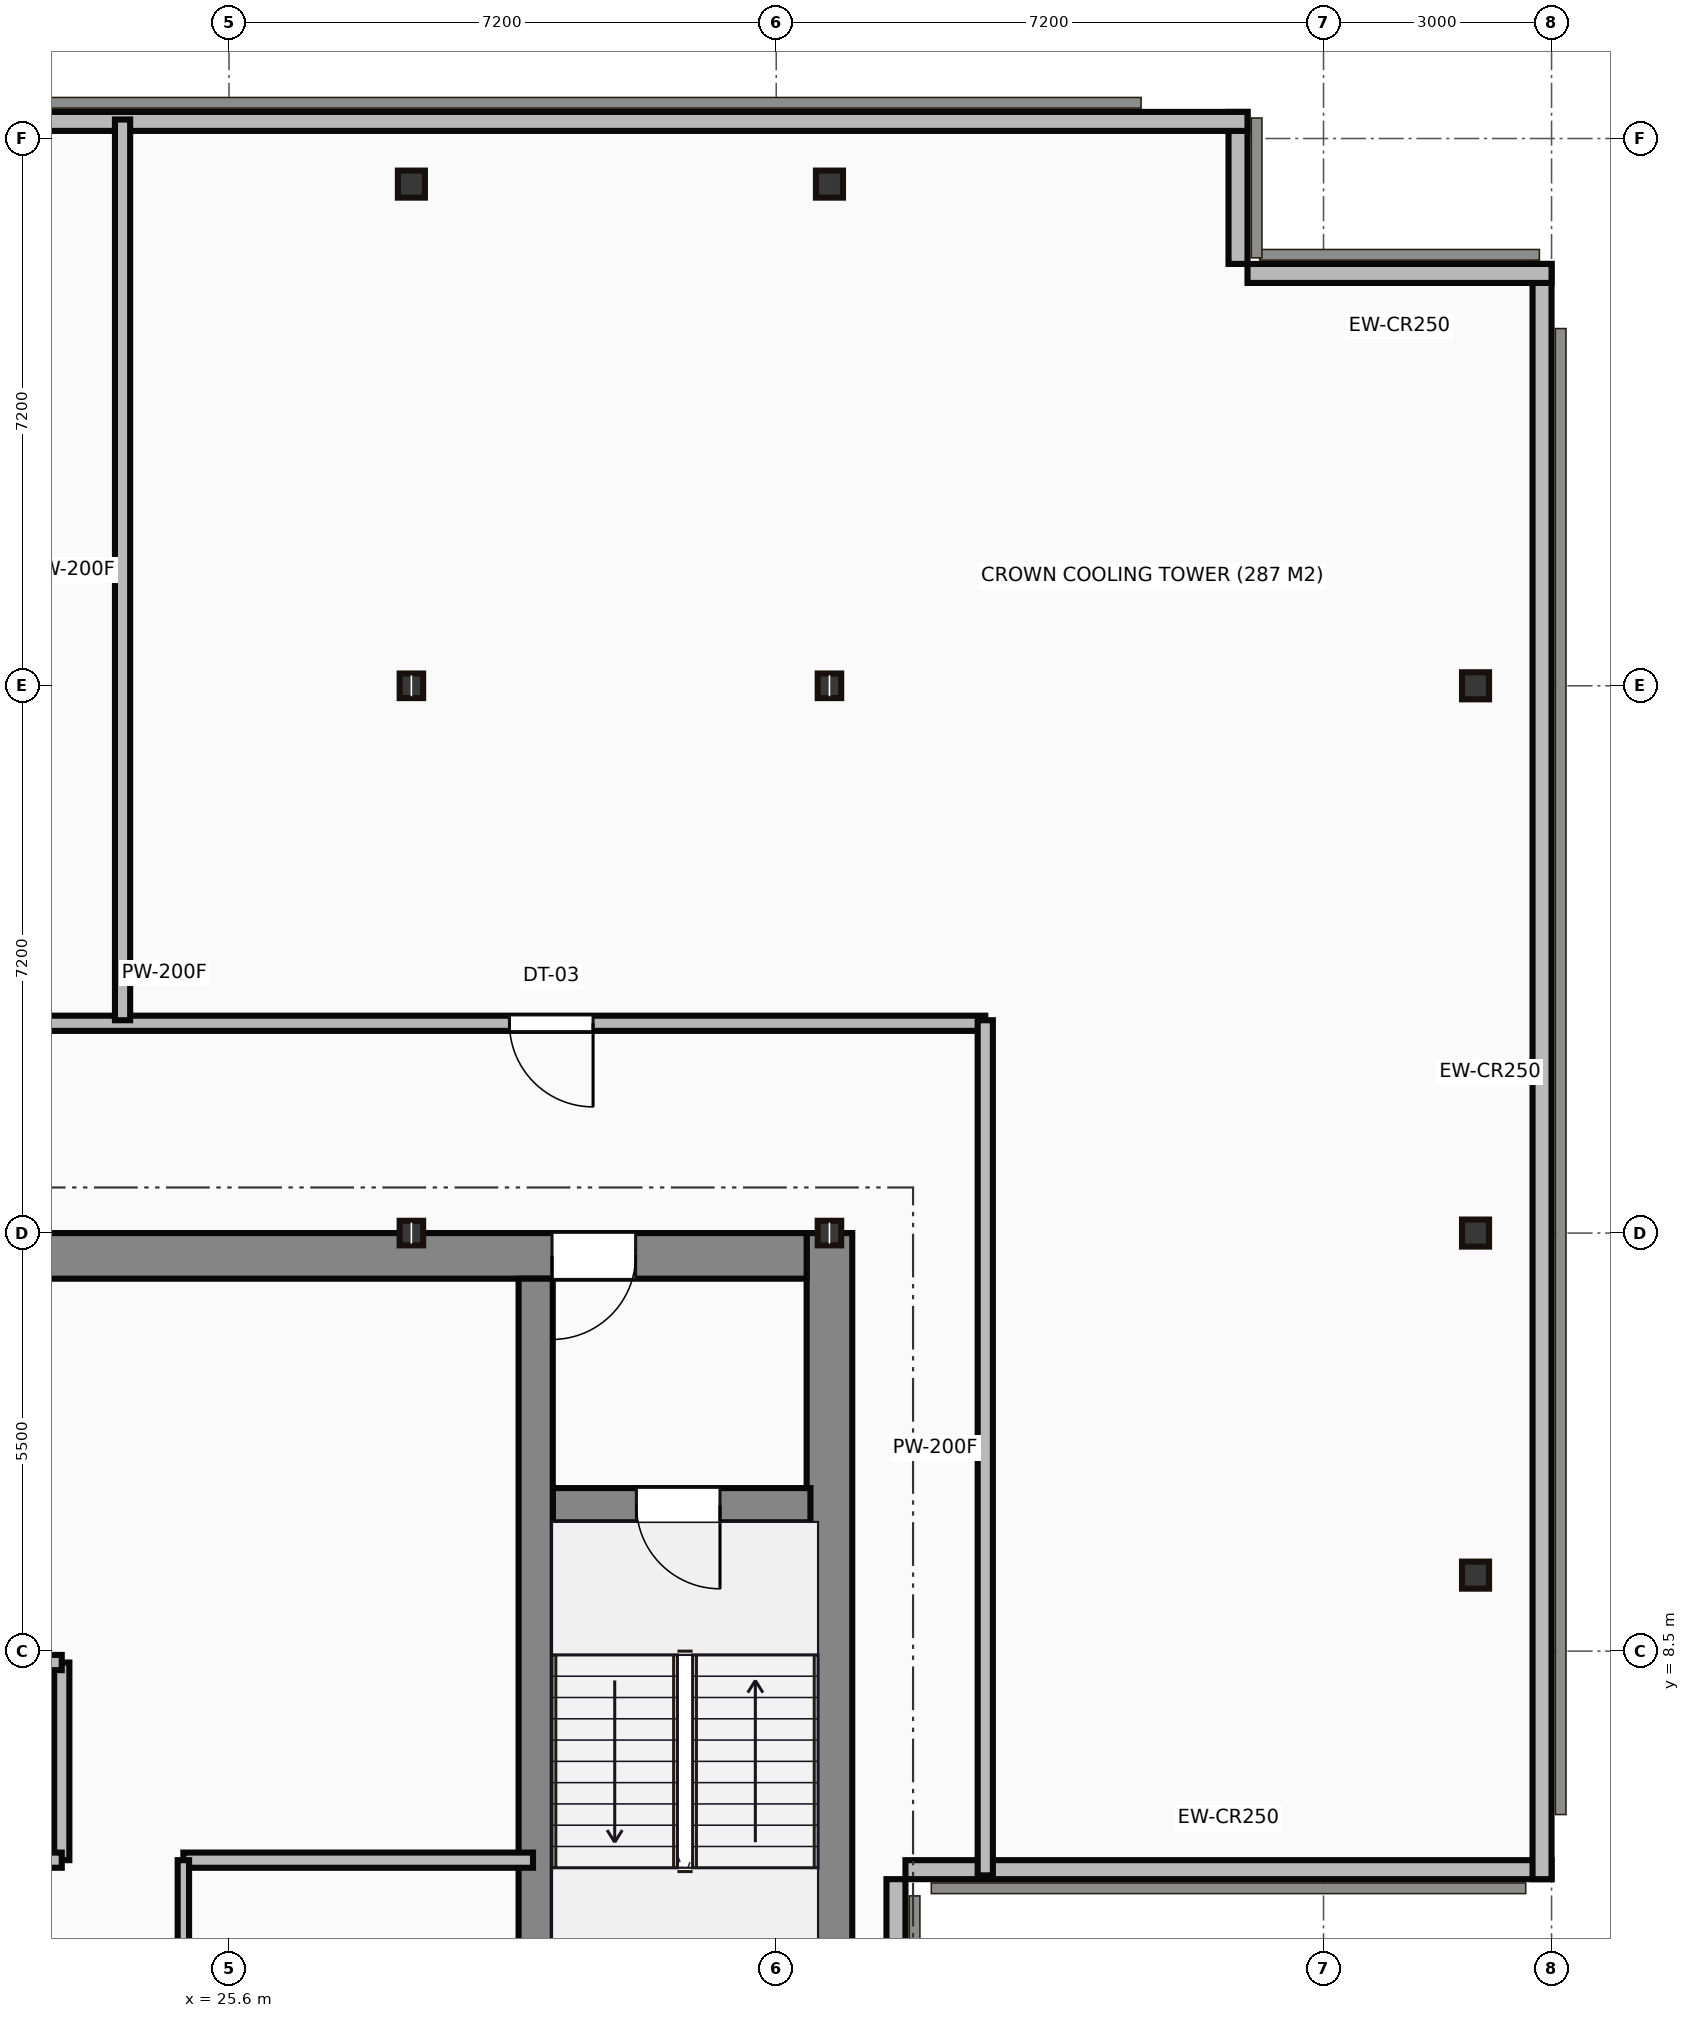
"""IFC4 building model, lengths in metres.
Left out: names, types, materials, properties, quantities, classifications, styles, units other than length and angle.
Written with IfcOpenShell. Run it as: python <this file> out.ifc"""

import sys

from ifc_helpers import new_model, si_unit, direction, frame, frame_2d, origin, origin_2d, place, context, subcontext, project, spatial, rectangle, hollow_rectangle, i_section, extrude, source, transform, mapped, element, fill, save


model = new_model("IFC4")
c1 = context("Model", 3, precision=1e-05, world=origin(), true_north=direction((0.0, 1.0)))
c2 = subcontext(c1, "Body", "Model", "MODEL_VIEW")
j1 = project(units=[si_unit("LENGTHUNIT", "METRE"), si_unit("PLANEANGLEUNIT", "RADIAN")], contexts=[c1])
p1 = place(None, origin())
s1 = spatial("IfcSite", under=j1, at=p1, CompositionType="ELEMENT")
p2 = place(p1, origin())
s2 = spatial("IfcBuilding", under=s1, at=p2, CompositionType="ELEMENT")
p3 = place(p2, frame((0.0, 0.0, 299.85)))
s3 = spatial("IfcBuildingStorey", under=s2, at=p3, CompositionType="ELEMENT", Elevation=299.85)
m1 = source(origin(), c2, "Body", "SweptSolid", [
    extrude(rectangle(XDim=13.1, YDim=0.6, at=frame_2d((6.55, 0.0))), origin(), (0.0, 0.0, 1.0), 3.8),
])
p4 = place(p3, frame((33.5, 0.9, 0.0), z_axis=(0.0, 0.0, 1.0), x_axis=(0.0, 1.0, 0.0)))
e1 = element("IfcWall", 1, at=p4, inside=s3, PredefinedType="SHEAR", context=c2, shape_type="MappedRepresentation", body=[
    mapped(m1, transform((0.0, 0.0, 0.0))),
])
m2 = source(origin(), c2, "Body", "SweptSolid", [
    extrude(rectangle(XDim=12.6, YDim=0.6, at=frame_2d((6.3, 0.0))), origin(), (0.0, 0.0, 1.0), 3.8),
])
p5 = place(p3, frame((20.6, 13.7, 0.0), z_axis=(0.0, 0.0, 1.0), x_axis=(1.0, 0.0, 0.0)))
e2 = element("IfcWall", 2, at=p5, inside=s3, PredefinedType="SHEAR", context=c2, shape_type="MappedRepresentation", body=[
    mapped(m2, transform((0.0, 0.0, 0.0))),
])
p6 = place(p5, frame((9.25, 0.0, 0.0)))
e3 = element("IfcOpeningElement", 3, at=p6, cuts=e2, PredefinedType="OPENING", context=c2, shape_type="SweptSolid", body=[
    extrude(rectangle(XDim=1.1, YDim=2.15, at=frame_2d((0.55, 1.075))), frame((0.0, 0.31, 0.0), z_axis=(0.0, -1.0, 0.0), x_axis=(1.0, 0.0, 0.0)), (0.0, 0.0, 1.0), 0.62),
])
m3 = source(origin(), c2, "Body", "SweptSolid", [
    extrude(rectangle(XDim=12.5, YDim=0.45, at=frame_2d((6.25, 0.0))), origin(), (0.0, 0.0, 1.0), 3.8),
])
p7 = place(p3, frame((29.635, 0.9, 0.0), z_axis=(0.0, 0.0, 1.0), x_axis=(0.0, 1.0, 0.0)))
e4 = element("IfcWall", 4, at=p7, inside=s3, PredefinedType="SHEAR", context=c2, shape_type="MappedRepresentation", body=[
    mapped(m3, transform((0.0, 0.0, 0.0))),
])
m4 = source(origin(), c2, "Body", "SweptSolid", [
    extrude(rectangle(XDim=3.39, YDim=0.45, at=frame_2d((1.695, 0.0))), origin(), (0.0, 0.0, 1.0), 3.8),
])
p8 = place(p3, frame((29.86, 10.42, 0.0), z_axis=(0.0, 0.0, 1.0), x_axis=(1.0, 0.0, 0.0)))
e5 = element("IfcWall", 5, at=p8, inside=s3, PredefinedType="SHEAR", context=c2, shape_type="MappedRepresentation", body=[
    mapped(m4, transform((0.0, 0.0, 0.0))),
])
p9 = place(p8, frame((1.1, 0.0, 0.0)))
e6 = element("IfcOpeningElement", 6, at=p9, cuts=e5, PredefinedType="OPENING", context=c2, shape_type="SweptSolid", body=[
    extrude(rectangle(XDim=1.1, YDim=2.15, at=frame_2d((0.55, 1.075))), frame((0.0, 0.235, 0.0), z_axis=(0.0, -1.0, 0.0), x_axis=(1.0, 0.0, 0.0)), (0.0, 0.0, 1.0), 0.47),
])
m5 = source(origin(), c2, "Body", "SweptSolid", [
    extrude(i_section(OverallWidth=0.309, OverallDepth=0.323, WebThickness=0.014, FlangeThickness=0.023, at=origin_2d()), origin(), (0.0, 0.0, 1.0), 3.8),
])
for number, where, z_axis, x_axis in (
    (7, (28.0, 14.0, 0.0), (0.0, 0.0, 1.0), (1.0, 0.0, 0.0)),
    (8, (28.0, 21.2, 0.0), (0.0, 0.0, 1.0), (1.0, 0.0, 0.0)),
):
    element("IfcColumn", number, at=place(p3, frame(where, z_axis=z_axis, x_axis=x_axis)), inside=s3, PredefinedType="COLUMN", context=c2, shape_type="MappedRepresentation", body=[
        mapped(m5, transform((0.0, 0.0, 0.0))),
    ])
m6 = source(origin(), c2, "Body", "SweptSolid", [
    extrude(hollow_rectangle(XDim=0.356, YDim=0.356, WallThickness=0.019, at=origin_2d()), origin(), (0.0, 0.0, 1.0), 3.8),
])
p10 = place(p3, frame((28.0, 27.8, 0.0), z_axis=(0.0, 0.0, 1.0), x_axis=(1.0, 0.0, 0.0)))
e9 = element("IfcColumn", 9, at=p10, inside=s3, PredefinedType="COLUMN", context=c2, shape_type="MappedRepresentation", body=[
    mapped(m6, transform((0.0, 0.0, 0.0))),
])
for number, where, z_axis, x_axis in (
    (10, (33.5, 14.0, 0.0), (0.0, 0.0, 1.0), (1.0, 0.0, 0.0)),
    (11, (33.5, 21.2, 0.0), (0.0, 0.0, 1.0), (1.0, 0.0, 0.0)),
):
    element("IfcColumn", number, at=place(p3, frame(where, z_axis=z_axis, x_axis=x_axis)), inside=s3, PredefinedType="COLUMN", context=c2, shape_type="MappedRepresentation", body=[
        mapped(m5, transform((0.0, 0.0, 0.0))),
    ])
for number, where, z_axis, x_axis in (
    (12, (33.5, 27.8, 0.0), (0.0, 0.0, 1.0), (1.0, 0.0, 0.0)),
    (13, (42.0, 9.5, 0.0), (0.0, 0.0, 1.0), (1.0, 0.0, 0.0)),
    (14, (42.0, 14.0, 0.0), (0.0, 0.0, 1.0), (1.0, 0.0, 0.0)),
    (15, (42.0, 21.2, 0.0), (0.0, 0.0, 1.0), (1.0, 0.0, 0.0)),
):
    element("IfcColumn", number, at=place(p3, frame(where, z_axis=z_axis, x_axis=x_axis)), inside=s3, PredefinedType="COLUMN", context=c2, shape_type="MappedRepresentation", body=[
        mapped(m6, transform((0.0, 0.0, 0.0))),
    ])
m7 = source(origin(), c2, "Body", "SweptSolid", [
    extrude(rectangle(XDim=5.5, YDim=0.25, at=frame_2d((2.75, 0.0))), origin(), (0.0, 0.0, 1.0), 3.5),
])
p11 = place(p3, frame((34.375, 0.0, 0.0), z_axis=(0.0, 0.0, 1.0), x_axis=(0.0, 1.0, 0.0)))
e16 = element("IfcWall", 16, at=p11, inside=s3, PredefinedType="STANDARD", context=c2, shape_type="MappedRepresentation", body=[
    mapped(m7, transform((0.0, 0.0, 0.0))),
])
m8 = source(origin(), c2, "Body", "SweptSolid", [
    extrude(rectangle(XDim=8.5, YDim=0.25, at=frame_2d((4.25, 0.0))), origin(), (0.0, 0.0, 1.0), 3.5),
])
p12 = place(p3, frame((34.5, 5.625, 0.0), z_axis=(0.0, 0.0, 1.0), x_axis=(1.0, 0.0, 0.0)))
e17 = element("IfcWall", 17, at=p12, inside=s3, PredefinedType="STANDARD", context=c2, shape_type="MappedRepresentation", body=[
    mapped(m8, transform((0.0, 0.0, 0.0))),
])
m9 = source(origin(), c2, "Body", "SweptSolid", [
    extrude(rectangle(XDim=21.25, YDim=0.25, at=frame_2d((10.625, 0.0))), origin(), (0.0, 0.0, 1.0), 3.5),
])
p13 = place(p3, frame((42.875, 5.5, 0.0), z_axis=(0.0, 0.0, 1.0), x_axis=(0.0, 1.0, 0.0)))
e18 = element("IfcWall", 18, at=p13, inside=s3, PredefinedType="STANDARD", context=c2, shape_type="MappedRepresentation", body=[
    mapped(m9, transform((0.0, 0.0, 0.0))),
])
m10 = source(origin(), c2, "Body", "SweptSolid", [
    extrude(rectangle(XDim=4.0, YDim=0.25, at=frame_2d((2.0, 0.0))), origin(), (0.0, 0.0, 1.0), 3.5),
])
p14 = place(p3, frame((43.0, 26.625, 0.0), z_axis=(0.0, 0.0, 1.0), x_axis=(-1.0, 0.0, 0.0)))
e19 = element("IfcWall", 19, at=p14, inside=s3, PredefinedType="STANDARD", context=c2, shape_type="MappedRepresentation", body=[
    mapped(m10, transform((0.0, 0.0, 0.0))),
])
m11 = source(origin(), c2, "Body", "SweptSolid", [
    extrude(rectangle(XDim=2.0, YDim=0.25, at=frame_2d((1.0, 0.0))), origin(), (0.0, 0.0, 1.0), 3.5),
])
p15 = place(p3, frame((38.875, 26.75, 0.0), z_axis=(0.0, 0.0, 1.0), x_axis=(0.0, 1.0, 0.0)))
e20 = element("IfcWall", 20, at=p15, inside=s3, PredefinedType="STANDARD", context=c2, shape_type="MappedRepresentation", body=[
    mapped(m11, transform((0.0, 0.0, 0.0))),
])
m12 = source(origin(), c2, "Body", "SweptSolid", [
    extrude(rectangle(XDim=35.0, YDim=0.25, at=frame_2d((17.5, 0.0))), origin(), (0.0, 0.0, 1.0), 3.5),
])
p16 = place(p3, frame((39.0, 28.625, 0.0), z_axis=(0.0, 0.0, 1.0), x_axis=(-1.0, 0.0, 0.0)))
e21 = element("IfcWall", 21, at=p16, inside=s3, PredefinedType="STANDARD", context=c2, shape_type="MappedRepresentation", body=[
    mapped(m12, transform((0.0, 0.0, 0.0))),
])
m13 = source(origin(), c2, "Body", "SweptSolid", [
    extrude(rectangle(XDim=11.85, YDim=0.2, at=frame_2d((5.925, 0.0))), origin(), (0.0, 0.0, 1.0), 3.5),
])
p17 = place(p3, frame((11.55, 5.75, 0.0), z_axis=(0.0, 0.0, 1.0), x_axis=(1.0, 0.0, 0.0)))
e22 = element("IfcWall", 22, at=p17, inside=s3, PredefinedType="PARTITIONING", context=c2, shape_type="MappedRepresentation", body=[
    mapped(m13, transform((0.0, 0.0, 0.0))),
])
p18 = place(p17, frame((5.2, 0.0, 0.0)))
e23 = element("IfcOpeningElement", 23, at=p18, cuts=e22, PredefinedType="OPENING", context=c2, shape_type="SweptSolid", body=[
    extrude(rectangle(XDim=1.1, YDim=2.15, at=frame_2d((0.55, 1.075))), frame((0.0, 0.11, 0.0), z_axis=(0.0, -1.0, 0.0), x_axis=(1.0, 0.0, 0.0)), (0.0, 0.0, 1.0), 0.22),
])
p19 = place(p3, frame((11.55, 8.35, 0.0), z_axis=(0.0, 0.0, 1.0), x_axis=(1.0, 0.0, 0.0)))
e24 = element("IfcWall", 24, at=p19, inside=s3, PredefinedType="PARTITIONING", context=c2, shape_type="MappedRepresentation", body=[
    mapped(m13, transform((0.0, 0.0, 0.0))),
])
m14 = source(origin(), c2, "Body", "SweptSolid", [
    extrude(rectangle(XDim=2.6, YDim=0.2, at=frame_2d((1.3, 0.0))), origin(), (0.0, 0.0, 1.0), 3.5),
])
p20 = place(p3, frame((23.4, 5.75, 0.0), z_axis=(0.0, 0.0, 1.0), x_axis=(0.0, 1.0, 0.0)))
e25 = element("IfcWall", 25, at=p20, inside=s3, PredefinedType="PARTITIONING", context=c2, shape_type="MappedRepresentation", body=[
    mapped(m14, transform((0.0, 0.0, 0.0))),
])
m15 = source(origin(), c2, "Body", "SweptSolid", [
    extrude(rectangle(XDim=4.9, YDim=0.15, at=frame_2d((2.45, 0.0))), origin(), (0.0, 0.0, 1.0), 3.5),
])
p21 = place(p3, frame((25.0, 0.85, 0.0), z_axis=(0.0, 0.0, 1.0), x_axis=(0.0, 1.0, 0.0)))
e26 = element("IfcWall", 26, at=p21, inside=s3, PredefinedType="PARTITIONING", context=c2, shape_type="MappedRepresentation", body=[
    mapped(m15, transform((0.0, 0.0, 0.0))),
])
p22 = place(p21, frame((2.4, 0.0, 0.0)))
e27 = element("IfcOpeningElement", 27, at=p22, cuts=e26, PredefinedType="OPENING", context=c2, shape_type="SweptSolid", body=[
    extrude(rectangle(XDim=0.95, YDim=2.15, at=frame_2d((0.475, 1.075))), frame((0.0, 0.085, 0.0), z_axis=(0.0, -1.0, 0.0), x_axis=(1.0, 0.0, 0.0)), (0.0, 0.0, 1.0), 0.17),
])
m16 = source(origin(), c2, "Body", "SweptSolid", [
    extrude(rectangle(XDim=4.6, YDim=0.2, at=frame_2d((2.3, 0.0))), origin(), (0.0, 0.0, 1.0), 3.5),
])
p23 = place(p3, frame((25.0, 5.75, 0.0), z_axis=(0.0, 0.0, 1.0), x_axis=(1.0, 0.0, 0.0)))
e28 = element("IfcWall", 28, at=p23, inside=s3, PredefinedType="PARTITIONING", context=c2, shape_type="MappedRepresentation", body=[
    mapped(m16, transform((0.0, 0.0, 0.0))),
])
m17 = source(origin(), c2, "Body", "SweptSolid", [
    extrude(rectangle(XDim=21.6, YDim=0.2, at=frame_2d((10.8, 0.0))), origin(), (0.0, 0.0, 1.0), 3.5),
])
p24 = place(p3, frame((13.95, 16.76, 0.0), z_axis=(0.0, 0.0, 1.0), x_axis=(1.0, 0.0, 0.0)))
e29 = element("IfcWall", 29, at=p24, inside=s3, PredefinedType="PARTITIONING", context=c2, shape_type="MappedRepresentation", body=[
    mapped(m17, transform((0.0, 0.0, 0.0))),
])
p25 = place(p24, frame((4.57, 0.0, 0.0)))
e30 = element("IfcOpeningElement", 30, at=p25, cuts=e29, PredefinedType="OPENING", context=c2, shape_type="SweptSolid", body=[
    extrude(rectangle(XDim=1.1, YDim=2.15, at=frame_2d((0.55, 1.075))), frame((0.0, 0.11, 0.0), z_axis=(0.0, -1.0, 0.0), x_axis=(1.0, 0.0, 0.0)), (0.0, 0.0, 1.0), 0.22),
])
p26 = place(p24, frame((15.34, 0.0, 0.0)))
e31 = element("IfcOpeningElement", 31, at=p26, cuts=e29, PredefinedType="OPENING", context=c2, shape_type="SweptSolid", body=[
    extrude(rectangle(XDim=1.1, YDim=2.15, at=frame_2d((0.55, 1.075))), frame((0.0, 0.11, 0.0), z_axis=(0.0, -1.0, 0.0), x_axis=(1.0, 0.0, 0.0)), (0.0, 0.0, 1.0), 0.22),
])
m18 = source(origin(), c2, "Body", "SweptSolid", [
    extrude(rectangle(XDim=11.25, YDim=0.2, at=frame_2d((5.625, 0.0))), origin(), (0.0, 0.0, 1.0), 3.5),
])
p27 = place(p3, frame((35.55, 5.55, 0.0), z_axis=(0.0, 0.0, 1.0), x_axis=(0.0, 1.0, 0.0)))
e32 = element("IfcWall", 32, at=p27, inside=s3, PredefinedType="PARTITIONING", context=c2, shape_type="MappedRepresentation", body=[
    mapped(m18, transform((0.0, 0.0, 0.0))),
])
p28 = place(p3, frame((24.2, 16.8, 0.0), z_axis=(0.0, 0.0, 1.0), x_axis=(0.0, 1.0, 0.0)))
e33 = element("IfcWall", 33, at=p28, inside=s3, PredefinedType="PARTITIONING", context=c2, shape_type="MappedRepresentation", body=[
    mapped(m13, transform((0.0, 0.0, 0.0))),
])
m19 = source(origin(), c2, "Body", "SweptSolid", [
    extrude(rectangle(XDim=1.1, YDim=2.15, at=frame_2d((0.55, 1.075))), frame((0.0, 0.025, 0.0), z_axis=(0.0, -1.0, 0.0), x_axis=(1.0, 0.0, 0.0)), (0.0, 0.0, 1.0), 0.05),
])
p29 = place(p9, frame((1.1, 0.0, 0.0), z_axis=(0.0, 0.0, 1.0), x_axis=(-1.0, 0.0, 0.0)))
e34 = element("IfcDoor", 34, at=p29, inside=s3, OperationType="SINGLE_SWING_RIGHT", PredefinedType="DOOR", context=c2, shape_type="MappedRepresentation", body=[
    mapped(m19, transform((0.0, 0.0, 0.0))),
])
fill(e6, e34)
p30 = place(p6, origin())
e35 = element("IfcDoor", 35, at=p30, inside=s3, OperationType="SINGLE_SWING_LEFT", PredefinedType="DOOR", context=c2, shape_type="MappedRepresentation", body=[
    mapped(m19, transform((0.0, 0.0, 0.0))),
])
fill(e3, e35)
p31 = place(p26, origin())
e36 = element("IfcDoor", 36, at=p31, inside=s3, OperationType="SINGLE_SWING_RIGHT", PredefinedType="DOOR", context=c2, shape_type="MappedRepresentation", body=[
    mapped(m19, transform((0.0, 0.0, 0.0))),
])
fill(e31, e36)
save(model, sys.argv[1])
